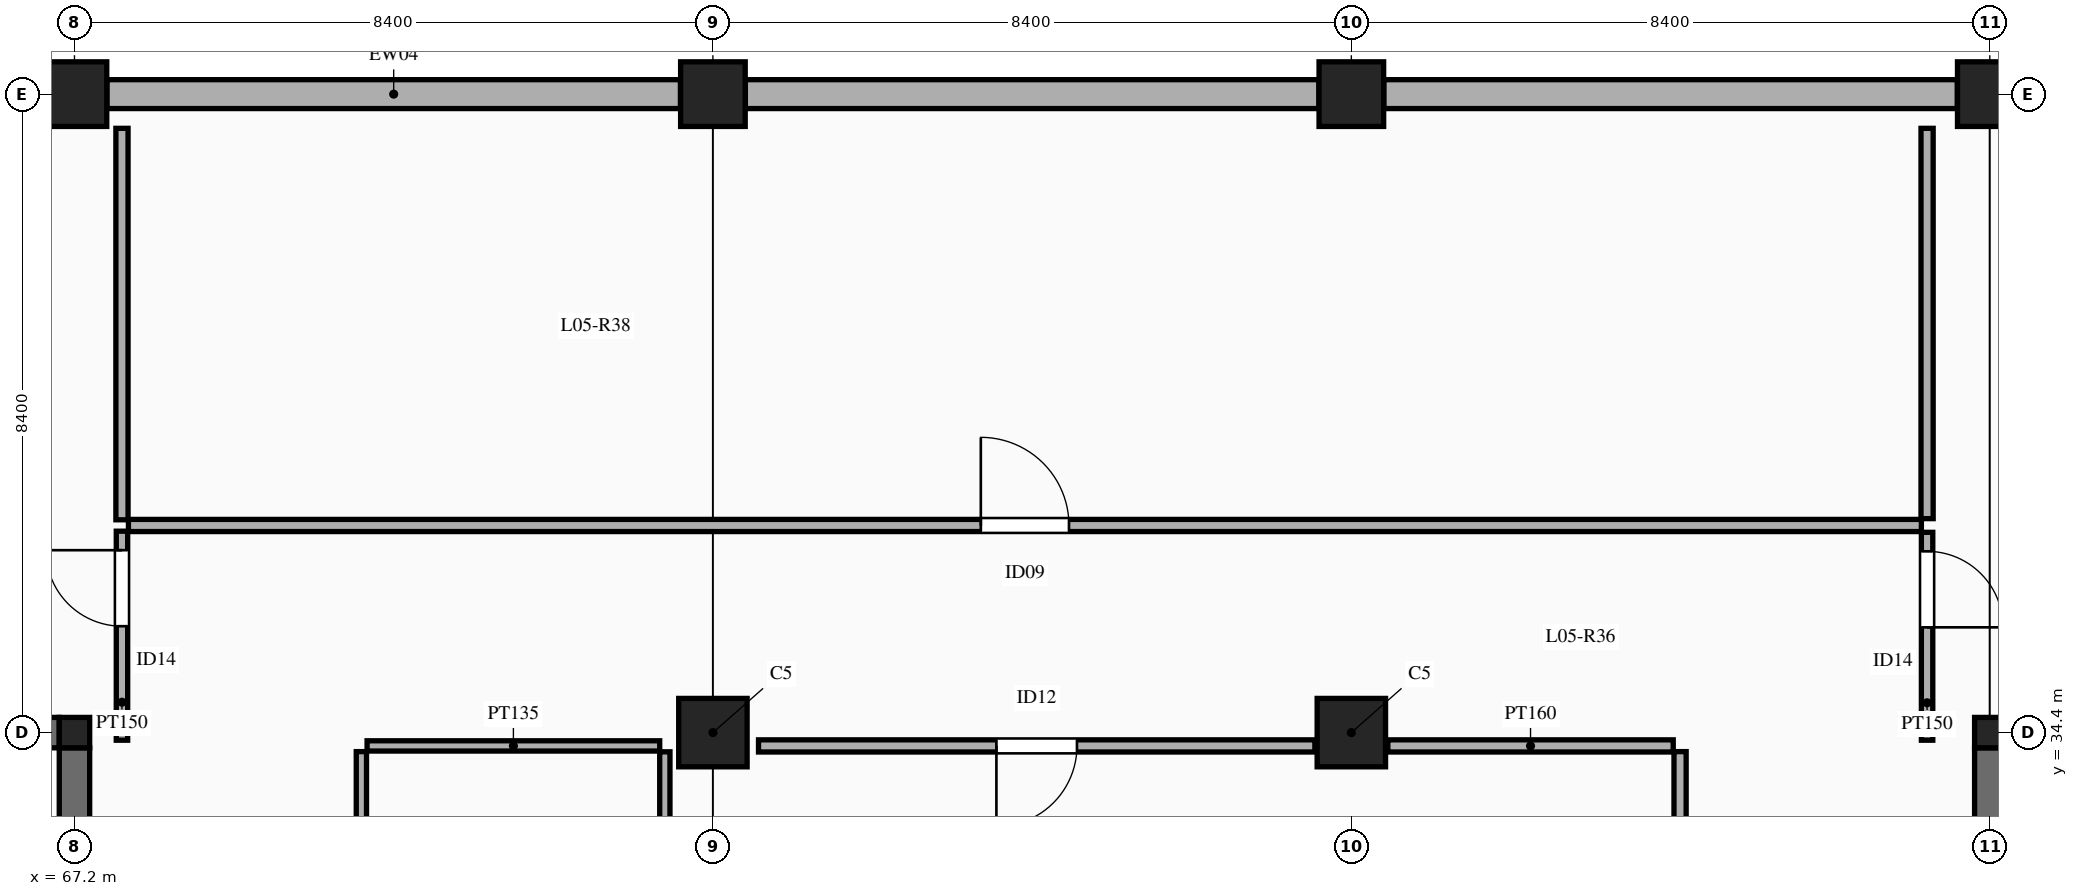
"""IFC4 building model, lengths in metres.
Left out: names, types, materials, properties, quantities, classifications, styles, units other than length and angle.
Written with IfcOpenShell. Run it as: python <this file> out.ifc"""

import sys

from ifc_helpers import new_model, si_unit, direction, frame, frame_2d, origin, origin_2d, place, context, subcontext, project, spatial, rectangle, extrude, element, fill, save


model = new_model("IFC4")
c1 = context("Model", 3, precision=1e-05, world=origin(), true_north=direction((0.0, 1.0)))
c2 = subcontext(c1, "Body", "Model", "MODEL_VIEW")
j1 = project(units=[si_unit("LENGTHUNIT", "METRE"), si_unit("PLANEANGLEUNIT", "RADIAN")], contexts=[c1])
p1 = place(None, origin())
s1 = spatial("IfcSite", under=j1, at=p1, CompositionType="ELEMENT")
p2 = place(p1, origin())
s2 = spatial("IfcBuilding", under=s1, at=p2, CompositionType="ELEMENT")
p3 = place(p2, frame((0.0, 0.0, 24.0)))
s3 = spatial("IfcBuildingStorey", under=s2, at=p3, CompositionType="ELEMENT", Elevation=24.0)
p4 = place(p3, frame((67.2, 34.4, 0.0), z_axis=(0.0, 0.0, 1.0), x_axis=(1.0, 0.0, 0.0)))
e1 = element("IfcColumn", 1, at=p4, inside=s3, PredefinedType="COLUMN", context=c2, shape_type="SweptSolid", body=[
    extrude(rectangle(XDim=0.4, YDim=0.4, at=origin_2d()), origin(), (0.0, 0.0, 1.0), 4.5),
])
p5 = place(p3, frame((67.2, 42.8, 0.0), z_axis=(0.0, 0.0, 1.0), x_axis=(1.0, 0.0, 0.0)))
e2 = element("IfcColumn", 2, at=p5, inside=s3, PredefinedType="COLUMN", context=c2, shape_type="SweptSolid", body=[
    extrude(rectangle(XDim=0.85, YDim=0.85, at=origin_2d()), origin(), (0.0, 0.0, 1.0), 4.5),
])
p6 = place(p3, frame((75.6, 34.4, 0.0), z_axis=(0.0, 0.0, 1.0), x_axis=(1.0, 0.0, 0.0)))
e3 = element("IfcColumn", 3, at=p6, inside=s3, PredefinedType="COLUMN", context=c2, shape_type="SweptSolid", body=[
    extrude(rectangle(XDim=0.9, YDim=0.9, at=origin_2d()), origin(), (0.0, 0.0, 1.0), 4.5),
])
p7 = place(p3, frame((75.6, 42.8, 0.0), z_axis=(0.0, 0.0, 1.0), x_axis=(1.0, 0.0, 0.0)))
e4 = element("IfcColumn", 4, at=p7, inside=s3, PredefinedType="COLUMN", context=c2, shape_type="SweptSolid", body=[
    extrude(rectangle(XDim=0.85, YDim=0.85, at=origin_2d()), origin(), (0.0, 0.0, 1.0), 4.5),
])
p8 = place(p3, frame((84.0, 34.4, 0.0), z_axis=(0.0, 0.0, 1.0), x_axis=(1.0, 0.0, 0.0)))
e5 = element("IfcColumn", 5, at=p8, inside=s3, PredefinedType="COLUMN", context=c2, shape_type="SweptSolid", body=[
    extrude(rectangle(XDim=0.9, YDim=0.9, at=origin_2d()), origin(), (0.0, 0.0, 1.0), 4.5),
])
p9 = place(p3, frame((84.0, 42.8, 0.0), z_axis=(0.0, 0.0, 1.0), x_axis=(1.0, 0.0, 0.0)))
e6 = element("IfcColumn", 6, at=p9, inside=s3, PredefinedType="COLUMN", context=c2, shape_type="SweptSolid", body=[
    extrude(rectangle(XDim=0.85, YDim=0.85, at=origin_2d()), origin(), (0.0, 0.0, 1.0), 4.5),
])
p10 = place(p3, frame((92.4, 34.4, 0.0), z_axis=(0.0, 0.0, 1.0), x_axis=(1.0, 0.0, 0.0)))
e7 = element("IfcColumn", 7, at=p10, inside=s3, PredefinedType="COLUMN", context=c2, shape_type="SweptSolid", body=[
    extrude(rectangle(XDim=0.4, YDim=0.4, at=origin_2d()), origin(), (0.0, 0.0, 1.0), 4.5),
])
p11 = place(p3, frame((92.4, 42.8, 0.0), z_axis=(0.0, 0.0, 1.0), x_axis=(1.0, 0.0, 0.0)))
e8 = element("IfcColumn", 8, at=p11, inside=s3, PredefinedType="COLUMN", context=c2, shape_type="SweptSolid", body=[
    extrude(rectangle(XDim=0.85, YDim=0.85, at=origin_2d()), origin(), (0.0, 0.0, 1.0), 4.5),
])
for number, where, z_axis, x_axis in (
    (9, (67.2, 26.2, 0.0), (0.0, 0.0, 1.0), (0.0, 1.0, 0.0)),
    (10, (59.0, 34.4, 0.0), (0.0, 0.0, 1.0), (1.0, 0.0, 0.0)),
    (11, (92.4, 26.2, 0.0), (0.0, 0.0, 1.0), (0.0, 1.0, 0.0)),
):
    element("IfcWall", number, at=place(p3, frame(where, z_axis=z_axis, x_axis=x_axis)), inside=s3, PredefinedType="SHEAR", context=c2, shape_type="SweptSolid", body=[
        extrude(rectangle(XDim=8.0, YDim=0.4, at=frame_2d((4.0, 0.0))), origin(), (0.0, 0.0, 1.0), 4.5),
    ])
p12 = place(p3, frame((67.627, 42.8, 0.0), z_axis=(0.0, 0.0, 1.0), x_axis=(1.0, 0.0, 0.0)))
e12 = element("IfcWall", 12, at=p12, inside=s3, PredefinedType="SOLIDWALL", context=c2, shape_type="SweptSolid", body=[
    extrude(rectangle(XDim=7.546, YDim=0.38, at=frame_2d((3.773, 0.0))), origin(), (0.0, 0.0, 1.0), 3.55),
])
for number, where, z_axis, x_axis in (
    (13, (76.027, 42.8, 0.0), (0.0, 0.0, 1.0), (1.0, 0.0, 0.0)),
    (14, (84.427, 42.8, 0.0), (0.0, 0.0, 1.0), (1.0, 0.0, 0.0)),
):
    element("IfcWall", number, at=place(p3, frame(where, z_axis=z_axis, x_axis=x_axis)), inside=s3, PredefinedType="SOLIDWALL", context=c2, shape_type="SweptSolid", body=[
        extrude(rectangle(XDim=7.546, YDim=0.38, at=frame_2d((3.773, 0.0))), origin(), (0.0, 0.0, 1.0), 3.55),
    ])
p13 = place(p3, frame((70.975, 30.25, 0.0), z_axis=(0.0, 0.0, 1.0), x_axis=(0.0, 1.0, 0.0)))
e15 = element("IfcWall", 15, at=p13, inside=s3, PredefinedType="PARTITIONING", context=c2, shape_type="SweptSolid", body=[
    extrude(rectangle(XDim=3.9, YDim=0.135, at=frame_2d((1.95, 0.0))), origin(), (0.0, 0.0, 1.0), 3.45),
])
p14 = place(p13, frame((1.46, 0.0, 0.0)))
e16 = element("IfcOpeningElement", 16, at=p14, cuts=e15, PredefinedType="OPENING", context=c2, shape_type="SweptSolid", body=[
    extrude(rectangle(XDim=0.98, YDim=2.15, at=frame_2d((0.49, 1.075))), frame((0.0, 0.077, 0.0), z_axis=(0.0, -1.0, 0.0), x_axis=(1.0, 0.0, 0.0)), (0.0, 0.0, 1.0), 0.155),
])
p15 = place(p3, frame((71.05, 34.225, 0.0), z_axis=(0.0, 0.0, 1.0), x_axis=(1.0, 0.0, 0.0)))
e17 = element("IfcWall", 17, at=p15, inside=s3, PredefinedType="PARTITIONING", context=c2, shape_type="SweptSolid", body=[
    extrude(rectangle(XDim=3.85, YDim=0.135, at=frame_2d((1.925, 0.0))), origin(), (0.0, 0.0, 1.0), 3.45),
])
p16 = place(p3, frame((88.325, 29.45, 0.0), z_axis=(0.0, 0.0, 1.0), x_axis=(0.0, 1.0, 0.0)))
e18 = element("IfcWall", 18, at=p16, inside=s3, PredefinedType="PARTITIONING", context=c2, shape_type="SweptSolid", body=[
    extrude(rectangle(XDim=4.7, YDim=0.16, at=frame_2d((2.35, 0.0))), origin(), (0.0, 0.0, 1.0), 3.45),
])
p17 = place(p3, frame((76.2, 34.225, 0.0), z_axis=(0.0, 0.0, 1.0), x_axis=(1.0, 0.0, 0.0)))
e19 = element("IfcWall", 19, at=p17, inside=s3, PredefinedType="PARTITIONING", context=c2, shape_type="SweptSolid", body=[
    extrude(rectangle(XDim=7.32, YDim=0.16, at=frame_2d((3.66, 0.0))), origin(), (0.0, 0.0, 1.0), 3.45),
])
p18 = place(p17, frame((3.13, 0.0, 0.0)))
e20 = element("IfcOpeningElement", 20, at=p18, cuts=e19, PredefinedType="OPENING", context=c2, shape_type="SweptSolid", body=[
    extrude(rectangle(XDim=1.06, YDim=2.18, at=frame_2d((0.53, 1.09))), frame((0.0, 0.09, 0.0), z_axis=(0.0, -1.0, 0.0), x_axis=(1.0, 0.0, 0.0)), (0.0, 0.0, 1.0), 0.18),
])
p19 = place(p3, frame((84.48, 34.225, 0.0), z_axis=(0.0, 0.0, 1.0), x_axis=(1.0, 0.0, 0.0)))
e21 = element("IfcWall", 21, at=p19, inside=s3, PredefinedType="PARTITIONING", context=c2, shape_type="SweptSolid", body=[
    extrude(rectangle(XDim=3.755, YDim=0.16, at=frame_2d((1.877, 0.0))), origin(), (0.0, 0.0, 1.0), 3.45),
])
p20 = place(p3, frame((67.825, 34.3, 0.0), z_axis=(0.0, 0.0, 1.0), x_axis=(0.0, 1.0, 0.0)))
e22 = element("IfcWall", 22, at=p20, inside=s3, PredefinedType="PARTITIONING", context=c2, shape_type="SweptSolid", body=[
    extrude(rectangle(XDim=2.75, YDim=0.15, at=frame_2d((1.375, 0.0))), origin(), (0.0, 0.0, 1.0), 3.45),
])
p21 = place(p20, frame((1.5, 0.0, 0.0)))
e23 = element("IfcOpeningElement", 23, at=p21, cuts=e22, PredefinedType="OPENING", context=c2, shape_type="SweptSolid", body=[
    extrude(rectangle(XDim=1.0, YDim=2.15, at=frame_2d((0.5, 1.075))), frame((0.0, 0.085, 0.0), z_axis=(0.0, -1.0, 0.0), x_axis=(1.0, 0.0, 0.0)), (0.0, 0.0, 1.0), 0.17),
])
p22 = place(p3, frame((67.91, 37.125, 0.0), z_axis=(0.0, 0.0, 1.0), x_axis=(1.0, 0.0, 0.0)))
e24 = element("IfcWall", 24, at=p22, inside=s3, PredefinedType="PARTITIONING", context=c2, shape_type="SweptSolid", body=[
    extrude(rectangle(XDim=23.59, YDim=0.16, at=frame_2d((11.795, 0.0))), origin(), (0.0, 0.0, 1.0), 3.45),
])
p23 = place(p22, frame((11.215, 0.0, 0.0)))
e25 = element("IfcOpeningElement", 25, at=p23, cuts=e24, PredefinedType="OPENING", context=c2, shape_type="SweptSolid", body=[
    extrude(rectangle(XDim=1.16, YDim=2.2, at=frame_2d((0.58, 1.1))), frame((0.0, 0.09, 0.0), z_axis=(0.0, -1.0, 0.0), x_axis=(1.0, 0.0, 0.0)), (0.0, 0.0, 1.0), 0.18),
])
p24 = place(p3, frame((91.575, 34.3, 0.0), z_axis=(0.0, 0.0, 1.0), x_axis=(0.0, 1.0, 0.0)))
e26 = element("IfcWall", 26, at=p24, inside=s3, PredefinedType="PARTITIONING", context=c2, shape_type="SweptSolid", body=[
    extrude(rectangle(XDim=2.735, YDim=0.15, at=frame_2d((1.367, 0.0))), origin(), (0.0, 0.0, 1.0), 3.45),
])
p25 = place(p24, frame((1.485, 0.0, 0.0)))
e27 = element("IfcOpeningElement", 27, at=p25, cuts=e26, PredefinedType="OPENING", context=c2, shape_type="SweptSolid", body=[
    extrude(rectangle(XDim=1.0, YDim=2.15, at=frame_2d((0.5, 1.075))), frame((0.0, 0.085, 0.0), z_axis=(0.0, -1.0, 0.0), x_axis=(1.0, 0.0, 0.0)), (0.0, 0.0, 1.0), 0.17),
])
p26 = place(p3, frame((67.825, 37.2, 0.0), z_axis=(0.0, 0.0, 1.0), x_axis=(0.0, 1.0, 0.0)))
e28 = element("IfcWall", 28, at=p26, inside=s3, PredefinedType="PARTITIONING", context=c2, shape_type="SweptSolid", body=[
    extrude(rectangle(XDim=5.15, YDim=0.16, at=frame_2d((2.575, 0.0))), origin(), (0.0, 0.0, 1.0), 3.45),
])
p27 = place(p3, frame((91.575, 37.215, 0.0), z_axis=(0.0, 0.0, 1.0), x_axis=(0.0, 1.0, 0.0)))
e29 = element("IfcWall", 29, at=p27, inside=s3, PredefinedType="PARTITIONING", context=c2, shape_type="SweptSolid", body=[
    extrude(rectangle(XDim=5.135, YDim=0.16, at=frame_2d((2.567, 0.0))), origin(), (0.0, 0.0, 1.0), 3.45),
])
p28 = place(p3, frame((74.968, 30.252, 0.0), z_axis=(0.0, 0.0, 1.0), x_axis=(0.0, 1.0, 0.0)))
e30 = element("IfcWall", 30, at=p28, inside=s3, PredefinedType="PARTITIONING", context=c2, shape_type="SweptSolid", body=[
    extrude(rectangle(XDim=3.895, YDim=0.135, at=frame_2d((1.948, 0.0))), origin(), (0.0, 0.0, 1.0), 3.45),
])
p29 = place(p18, frame((1.06, 0.0, 0.0), z_axis=(0.0, 0.0, 1.0), x_axis=(-1.0, 0.0, 0.0)))
e31 = element("IfcDoor", 31, at=p29, inside=s3, OperationType="SINGLE_SWING_RIGHT", PredefinedType="DOOR", context=c2, shape_type="SweptSolid", body=[
    extrude(rectangle(XDim=1.06, YDim=2.18, at=frame_2d((0.53, 1.09))), frame((0.0, 0.025, 0.0), z_axis=(0.0, -1.0, 0.0), x_axis=(1.0, 0.0, 0.0)), (0.0, 0.0, 1.0), 0.05),
])
fill(e20, e31)
p30 = place(p21, origin())
e32 = element("IfcDoor", 32, at=p30, inside=s3, OperationType="SINGLE_SWING_RIGHT", PredefinedType="DOOR", context=c2, shape_type="SweptSolid", body=[
    extrude(rectangle(XDim=1.0, YDim=2.15, at=frame_2d((0.5, 1.075))), frame((0.0, 0.025, 0.0), z_axis=(0.0, -1.0, 0.0), x_axis=(1.0, 0.0, 0.0)), (0.0, 0.0, 1.0), 0.05),
])
fill(e23, e32)
p31 = place(p23, origin())
e33 = element("IfcDoor", 33, at=p31, inside=s3, OperationType="SINGLE_SWING_LEFT", PredefinedType="DOOR", context=c2, shape_type="SweptSolid", body=[
    extrude(rectangle(XDim=1.16, YDim=2.2, at=frame_2d((0.58, 1.1))), frame((0.0, 0.025, 0.0), z_axis=(0.0, -1.0, 0.0), x_axis=(1.0, 0.0, 0.0)), (0.0, 0.0, 1.0), 0.05),
])
fill(e25, e33)
p32 = place(p25, frame((1.0, 0.0, 0.0), z_axis=(0.0, 0.0, 1.0), x_axis=(-1.0, 0.0, 0.0)))
e34 = element("IfcDoor", 34, at=p32, inside=s3, OperationType="SINGLE_SWING_RIGHT", PredefinedType="DOOR", context=c2, shape_type="SweptSolid", body=[
    extrude(rectangle(XDim=1.0, YDim=2.15, at=frame_2d((0.5, 1.075))), frame((0.0, 0.025, 0.0), z_axis=(0.0, -1.0, 0.0), x_axis=(1.0, 0.0, 0.0)), (0.0, 0.0, 1.0), 0.05),
])
fill(e27, e34)
save(model, sys.argv[1])
